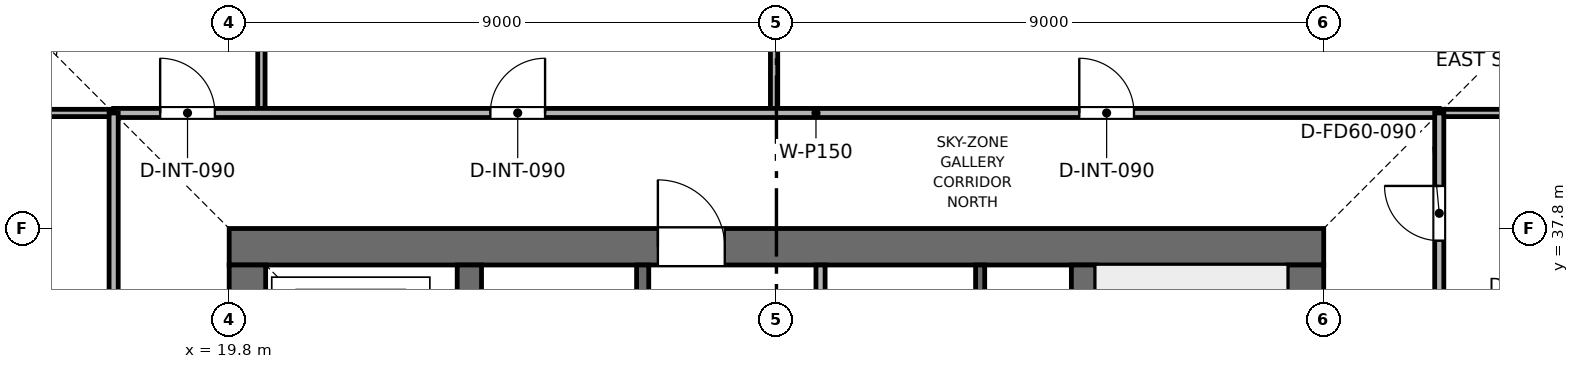
"""IFC4 building model, lengths in metres.
Left out: names, types, materials, properties, quantities, classifications, styles, units other than length and angle.
Written with IfcOpenShell. Run it as: python <this file> out.ifc"""

import sys

from ifc_helpers import new_model, si_unit, direction, frame, frame_2d, origin, place, context, subcontext, project, spatial, rectangle, extrude, element, fill, save


model = new_model("IFC4")
c1 = context("Model", 3, precision=1e-05, world=origin(), true_north=direction((0.0, 1.0)))
c2 = subcontext(c1, "Body", "Model", "MODEL_VIEW")
j1 = project(units=[si_unit("LENGTHUNIT", "METRE"), si_unit("PLANEANGLEUNIT", "RADIAN")], contexts=[c1])
p1 = place(None, origin())
s1 = spatial("IfcSite", under=j1, at=p1, CompositionType="ELEMENT")
p2 = place(p1, origin())
s2 = spatial("IfcBuilding", under=s1, at=p2, CompositionType="ELEMENT")
p3 = place(p2, frame((0.0, 0.0, 355.5)))
s3 = spatial("IfcBuildingStorey", under=s2, at=p3, CompositionType="ELEMENT", Elevation=355.5)
p4 = place(p3, frame((19.8, 37.5, 0.0), z_axis=(0.0, 0.0, 1.0), x_axis=(1.0, 0.0, 0.0)))
e1 = element("IfcWall", 1, at=p4, inside=s3, PredefinedType="SHEAR", context=c2, shape_type="SweptSolid", body=[
    extrude(rectangle(XDim=18.0, YDim=0.6, at=frame_2d((9.0, 0.0))), origin(), (0.0, 0.0, 1.0), 4.5),
])
p5 = place(p4, frame((7.05, 0.0, 0.0)))
e2 = element("IfcOpeningElement", 2, at=p5, cuts=e1, PredefinedType="OPENING", context=c2, shape_type="SweptSolid", body=[
    extrude(rectangle(XDim=1.1, YDim=2.15, at=frame_2d((0.55, 1.075))), frame((0.0, 0.31, 0.0), z_axis=(0.0, -1.0, 0.0), x_axis=(1.0, 0.0, 0.0)), (0.0, 0.0, 1.0), 0.62),
])
p6 = place(p3, frame((20.1, 20.4, 0.0), z_axis=(0.0, 0.0, 1.0), x_axis=(0.0, 1.0, 0.0)))
e3 = element("IfcWall", 3, at=p6, inside=s3, PredefinedType="SHEAR", context=c2, shape_type="SweptSolid", body=[
    extrude(rectangle(XDim=16.8, YDim=0.6, at=frame_2d((8.4, 0.0))), origin(), (0.0, 0.0, 1.0), 4.5),
])
p7 = place(p6, frame((10.4, 0.0, 0.0)))
e4 = element("IfcOpeningElement", 4, at=p7, cuts=e3, PredefinedType="OPENING", context=c2, shape_type="SweptSolid", body=[
    extrude(rectangle(XDim=1.1, YDim=2.15, at=frame_2d((0.55, 1.075))), frame((0.0, 0.31, 0.0), z_axis=(0.0, -1.0, 0.0), x_axis=(1.0, 0.0, 0.0)), (0.0, 0.0, 1.0), 0.62),
])
p8 = place(p3, frame((37.5, 20.4, 0.0), z_axis=(0.0, 0.0, 1.0), x_axis=(0.0, 1.0, 0.0)))
e5 = element("IfcWall", 5, at=p8, inside=s3, PredefinedType="SHEAR", context=c2, shape_type="SweptSolid", body=[
    extrude(rectangle(XDim=16.8, YDim=0.6, at=frame_2d((8.4, 0.0))), origin(), (0.0, 0.0, 1.0), 4.5),
])
p9 = place(p8, frame((4.9, 0.0, 0.0)))
e6 = element("IfcOpeningElement", 6, at=p9, cuts=e5, PredefinedType="OPENING", context=c2, shape_type="SweptSolid", body=[
    extrude(rectangle(XDim=1.1, YDim=2.15, at=frame_2d((0.55, 1.075))), frame((0.0, 0.31, 0.0), z_axis=(0.0, -1.0, 0.0), x_axis=(1.0, 0.0, 0.0)), (0.0, 0.0, 1.0), 0.62),
])
for number, where, z_axis, x_axis in (
    (7, (23.75, 20.4, 0.0), (0.0, 0.0, 1.0), (0.0, 1.0, 0.0)),
    (8, (33.85, 20.4, 0.0), (0.0, 0.0, 1.0), (0.0, 1.0, 0.0)),
):
    element("IfcWall", number, at=place(p3, frame(where, z_axis=z_axis, x_axis=x_axis)), inside=s3, PredefinedType="SHEAR", context=c2, shape_type="SweptSolid", body=[
        extrude(rectangle(XDim=16.8, YDim=0.4, at=frame_2d((8.4, 0.0))), origin(), (0.0, 0.0, 1.0), 4.5),
    ])
p10 = place(p3, frame((32.15, 34.0, 0.0), z_axis=(0.0, 0.0, 1.0), x_axis=(0.0, 1.0, 0.0)))
e9 = element("IfcWall", 9, at=p10, inside=s3, PredefinedType="SHEAR", context=c2, shape_type="SweptSolid", body=[
    extrude(rectangle(XDim=3.2, YDim=0.15, at=frame_2d((1.6, 0.0))), origin(), (0.0, 0.0, 1.0), 4.24),
])
p11 = place(p3, frame((26.6, 34.0, 0.0), z_axis=(0.0, 0.0, 1.0), x_axis=(0.0, 1.0, 0.0)))
e10 = element("IfcWall", 10, at=p11, inside=s3, PredefinedType="SHEAR", context=c2, shape_type="SweptSolid", body=[
    extrude(rectangle(XDim=3.2, YDim=0.2, at=frame_2d((1.6, 0.0))), origin(), (0.0, 0.0, 1.0), 4.24),
])
p12 = place(p11, frame((0.75, 0.0, 0.0)))
e11 = element("IfcOpeningElement", 11, at=p12, cuts=e10, PredefinedType="OPENING", context=c2, shape_type="SweptSolid", body=[
    extrude(rectangle(XDim=1.1, YDim=2.15, at=frame_2d((0.55, 1.075))), frame((0.0, 0.11, 0.0), z_axis=(0.0, -1.0, 0.0), x_axis=(1.0, 0.0, 0.0)), (0.0, 0.0, 1.0), 0.22),
])
p13 = place(p3, frame((29.525, 33.925, 0.0), z_axis=(0.0, 0.0, 1.0), x_axis=(0.0, 1.0, 0.0)))
e12 = element("IfcWall", 12, at=p13, inside=s3, PredefinedType="PARTITIONING", context=c2, shape_type="SweptSolid", body=[
    extrude(rectangle(XDim=3.275, YDim=0.15, at=frame_2d((1.637, 0.0))), origin(), (0.0, 0.0, 1.0), 4.24),
])
p14 = place(p13, frame((0.85, 0.0, 0.0)))
e13 = element("IfcOpeningElement", 13, at=p14, cuts=e12, PredefinedType="OPENING", context=c2, shape_type="SweptSolid", body=[
    extrude(rectangle(XDim=0.9, YDim=2.1, at=frame_2d((0.45, 1.05))), frame((0.0, 0.085, 0.0), z_axis=(0.0, -1.0, 0.0), x_axis=(1.0, 0.0, 0.0)), (0.0, 0.0, 1.0), 0.17),
])
for number, where, z_axis, x_axis in (
    (14, (20.33, 39.7, 0.0), (0.0, 0.0, 1.0), (0.0, 1.0, 0.0)),
    (15, (28.761, 39.7, 0.0), (0.0, 0.0, 1.0), (0.0, 1.0, 0.0)),
):
    element("IfcWall", number, at=place(p3, frame(where, z_axis=z_axis, x_axis=x_axis)), inside=s3, PredefinedType="PARTITIONING", context=c2, shape_type="SweptSolid", body=[
        extrude(rectangle(XDim=9.37, YDim=0.12, at=frame_2d((4.685, 0.0))), origin(), (0.0, 0.0, 1.0), 3.825),
    ])
p15 = place(p3, frame((8.53, 39.7, 0.0), z_axis=(0.0, 0.0, 1.0), x_axis=(1.0, 0.0, 0.0)))
e16 = element("IfcWall", 16, at=p15, inside=s3, PredefinedType="PARTITIONING", context=c2, shape_type="SweptSolid", body=[
    extrude(rectangle(XDim=9.37, YDim=0.12, at=frame_2d((4.685, 0.0))), origin(), (0.0, 0.0, 1.0), 3.825),
])
p16 = place(p3, frame((39.7, 39.7, 0.0), z_axis=(0.0, 0.0, 1.0), x_axis=(1.0, 0.0, 0.0)))
e17 = element("IfcWall", 17, at=p16, inside=s3, PredefinedType="PARTITIONING", context=c2, shape_type="SweptSolid", body=[
    extrude(rectangle(XDim=9.37, YDim=0.12, at=frame_2d((4.685, 0.0))), origin(), (0.0, 0.0, 1.0), 3.825),
])
p17 = place(p3, frame((17.9, 39.7, 0.0), z_axis=(0.0, 0.0, 1.0), x_axis=(1.0, 0.0, 0.0)))
e18 = element("IfcWall", 18, at=p17, inside=s3, PredefinedType="PARTITIONING", context=c2, shape_type="SweptSolid", body=[
    extrude(rectangle(XDim=21.8, YDim=0.15, at=frame_2d((10.9, 0.0))), origin(), (0.0, 0.0, 1.0), 3.825),
])
p18 = place(p17, frame((0.765, 0.0, 0.0)))
e19 = element("IfcOpeningElement", 19, at=p18, cuts=e18, PredefinedType="OPENING", context=c2, shape_type="SweptSolid", body=[
    extrude(rectangle(XDim=0.9, YDim=2.1, at=frame_2d((0.45, 1.05))), frame((0.0, 0.085, 0.0), z_axis=(0.0, -1.0, 0.0), x_axis=(1.0, 0.0, 0.0)), (0.0, 0.0, 1.0), 0.17),
])
p19 = place(p17, frame((6.195, 0.0, 0.0)))
e20 = element("IfcOpeningElement", 20, at=p19, cuts=e18, PredefinedType="OPENING", context=c2, shape_type="SweptSolid", body=[
    extrude(rectangle(XDim=0.9, YDim=2.1, at=frame_2d((0.45, 1.05))), frame((0.0, 0.085, 0.0), z_axis=(0.0, -1.0, 0.0), x_axis=(1.0, 0.0, 0.0)), (0.0, 0.0, 1.0), 0.17),
])
p20 = place(p17, frame((15.88, 0.0, 0.0)))
e21 = element("IfcOpeningElement", 21, at=p20, cuts=e18, PredefinedType="OPENING", context=c2, shape_type="SweptSolid", body=[
    extrude(rectangle(XDim=0.9, YDim=2.1, at=frame_2d((0.45, 1.05))), frame((0.0, 0.085, 0.0), z_axis=(0.0, -1.0, 0.0), x_axis=(1.0, 0.0, 0.0)), (0.0, 0.0, 1.0), 0.17),
])
p21 = place(p3, frame((17.9, 14.0, 0.0), z_axis=(0.0, 0.0, 1.0), x_axis=(0.0, 1.0, 0.0)))
e22 = element("IfcWall", 22, at=p21, inside=s3, PredefinedType="PARTITIONING", context=c2, shape_type="SweptSolid", body=[
    extrude(rectangle(XDim=25.7, YDim=0.15, at=frame_2d((12.85, 0.0))), origin(), (0.0, 0.0, 1.0), 3.825),
])
p22 = place(p21, frame((12.4, 0.0, 0.0)))
e23 = element("IfcOpeningElement", 23, at=p22, cuts=e22, PredefinedType="OPENING", context=c2, shape_type="SweptSolid", body=[
    extrude(rectangle(XDim=0.9, YDim=2.1, at=frame_2d((0.45, 1.05))), frame((0.0, 0.085, 0.0), z_axis=(0.0, -1.0, 0.0), x_axis=(1.0, 0.0, 0.0)), (0.0, 0.0, 1.0), 0.17),
])
p23 = place(p3, frame((39.7, 24.4, 0.0), z_axis=(0.0, 0.0, 1.0), x_axis=(0.0, 1.0, 0.0)))
e24 = element("IfcWall", 24, at=p23, inside=s3, PredefinedType="PARTITIONING", context=c2, shape_type="SweptSolid", body=[
    extrude(rectangle(XDim=15.3, YDim=0.15, at=frame_2d((7.65, 0.0))), origin(), (0.0, 0.0, 1.0), 3.825),
])
p24 = place(p23, frame((1.35, 0.0, 0.0)))
e25 = element("IfcOpeningElement", 25, at=p24, cuts=e24, PredefinedType="OPENING", context=c2, shape_type="SweptSolid", body=[
    extrude(rectangle(XDim=0.9, YDim=2.1, at=frame_2d((0.45, 1.05))), frame((0.0, 0.085, 0.0), z_axis=(0.0, -1.0, 0.0), x_axis=(1.0, 0.0, 0.0)), (0.0, 0.0, 1.0), 0.17),
])
p25 = place(p23, frame((4.55, 0.0, 0.0)))
e26 = element("IfcOpeningElement", 26, at=p25, cuts=e24, PredefinedType="OPENING", context=c2, shape_type="SweptSolid", body=[
    extrude(rectangle(XDim=0.9, YDim=2.1, at=frame_2d((0.45, 1.05))), frame((0.0, 0.085, 0.0), z_axis=(0.0, -1.0, 0.0), x_axis=(1.0, 0.0, 0.0)), (0.0, 0.0, 1.0), 0.17),
])
p26 = place(p23, frame((7.45, 0.0, 0.0)))
e27 = element("IfcOpeningElement", 27, at=p26, cuts=e24, PredefinedType="OPENING", context=c2, shape_type="SweptSolid", body=[
    extrude(rectangle(XDim=0.9, YDim=2.1, at=frame_2d((0.45, 1.05))), frame((0.0, 0.085, 0.0), z_axis=(0.0, -1.0, 0.0), x_axis=(1.0, 0.0, 0.0)), (0.0, 0.0, 1.0), 0.17),
])
p27 = place(p23, frame((10.2, 0.0, 0.0)))
e28 = element("IfcOpeningElement", 28, at=p27, cuts=e24, PredefinedType="OPENING", context=c2, shape_type="SweptSolid", body=[
    extrude(rectangle(XDim=0.95, YDim=2.1, at=frame_2d((0.475, 1.05))), frame((0.0, 0.085, 0.0), z_axis=(0.0, -1.0, 0.0), x_axis=(1.0, 0.0, 0.0)), (0.0, 0.0, 1.0), 0.17),
])
p28 = place(p23, frame((13.2, 0.0, 0.0)))
e29 = element("IfcOpeningElement", 29, at=p28, cuts=e24, PredefinedType="OPENING", context=c2, shape_type="SweptSolid", body=[
    extrude(rectangle(XDim=0.9, YDim=2.1, at=frame_2d((0.45, 1.05))), frame((0.0, 0.085, 0.0), z_axis=(0.0, -1.0, 0.0), x_axis=(1.0, 0.0, 0.0)), (0.0, 0.0, 1.0), 0.17),
])
p29 = place(p18, origin())
e30 = element("IfcDoor", 30, at=p29, inside=s3, OperationType="SINGLE_SWING_LEFT", PredefinedType="DOOR", context=c2, shape_type="SweptSolid", body=[
    extrude(rectangle(XDim=0.9, YDim=2.1, at=frame_2d((0.45, 1.05))), frame((0.0, 0.025, 0.0), z_axis=(0.0, -1.0, 0.0), x_axis=(1.0, 0.0, 0.0)), (0.0, 0.0, 1.0), 0.05),
])
fill(e19, e30)
p30 = place(p19, origin())
e31 = element("IfcDoor", 31, at=p30, inside=s3, OperationType="SINGLE_SWING_RIGHT", PredefinedType="DOOR", context=c2, shape_type="SweptSolid", body=[
    extrude(rectangle(XDim=0.9, YDim=2.1, at=frame_2d((0.45, 1.05))), frame((0.0, 0.025, 0.0), z_axis=(0.0, -1.0, 0.0), x_axis=(1.0, 0.0, 0.0)), (0.0, 0.0, 1.0), 0.05),
])
fill(e20, e31)
p31 = place(p20, origin())
e32 = element("IfcDoor", 32, at=p31, inside=s3, OperationType="SINGLE_SWING_LEFT", PredefinedType="DOOR", context=c2, shape_type="SweptSolid", body=[
    extrude(rectangle(XDim=0.9, YDim=2.1, at=frame_2d((0.45, 1.05))), frame((0.0, 0.025, 0.0), z_axis=(0.0, -1.0, 0.0), x_axis=(1.0, 0.0, 0.0)), (0.0, 0.0, 1.0), 0.05),
])
fill(e21, e32)
p32 = place(p28, origin())
e33 = element("IfcDoor", 33, at=p32, inside=s3, OperationType="SINGLE_SWING_RIGHT", PredefinedType="DOOR", context=c2, shape_type="SweptSolid", body=[
    extrude(rectangle(XDim=0.9, YDim=2.1, at=frame_2d((0.45, 1.05))), frame((0.0, 0.025, 0.0), z_axis=(0.0, -1.0, 0.0), x_axis=(1.0, 0.0, 0.0)), (0.0, 0.0, 1.0), 0.05),
])
fill(e29, e33)
p33 = place(p5, origin())
e34 = element("IfcDoor", 34, at=p33, inside=s3, OperationType="SINGLE_SWING_LEFT", PredefinedType="DOOR", context=c2, shape_type="SweptSolid", body=[
    extrude(rectangle(XDim=1.1, YDim=2.15, at=frame_2d((0.55, 1.075))), frame((0.0, 0.025, 0.0), z_axis=(0.0, -1.0, 0.0), x_axis=(1.0, 0.0, 0.0)), (0.0, 0.0, 1.0), 0.05),
])
fill(e2, e34)
save(model, sys.argv[1])
